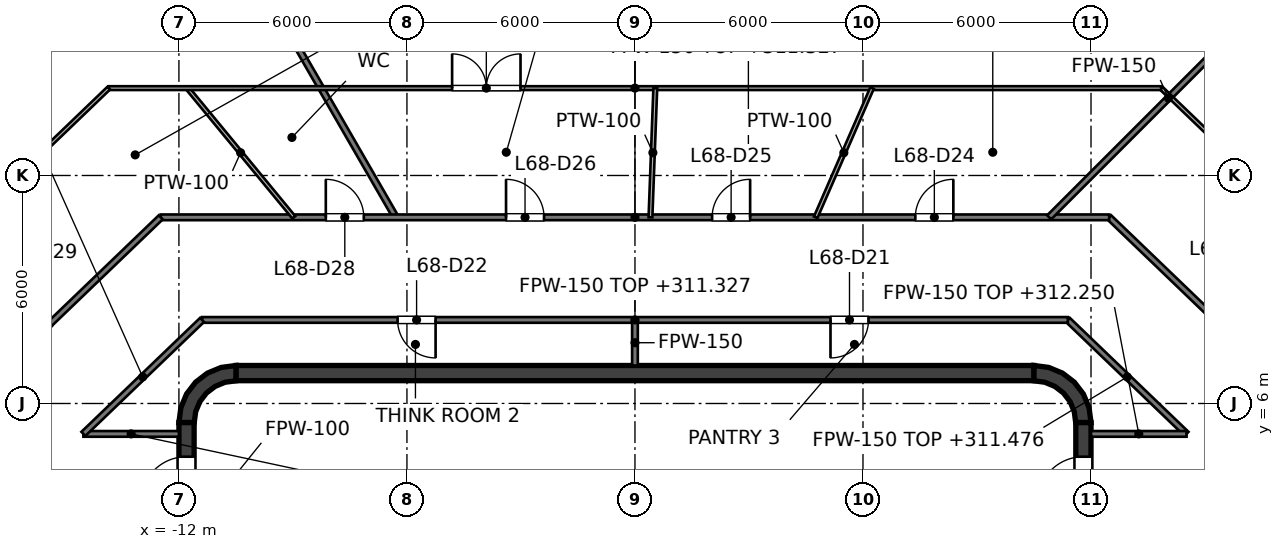
"""IFC4 building model, lengths in metres.
Left out: names, types, materials, properties, quantities, classifications, styles, units other than length and angle.
Written with IfcOpenShell. Run it as: python <this file> out.ifc"""

import sys

from ifc_helpers import new_model, si_unit, direction, frame, frame_2d, origin, place, context, subcontext, project, spatial, polyline, rectangle, outline, extrude, element, fill, save


model = new_model("IFC4")
c1 = context("Model", 3, precision=1e-05, world=origin(), true_north=direction((0.0, 1.0)))
c2 = subcontext(c1, "Body", "Model", "MODEL_VIEW")
j1 = project(units=[si_unit("LENGTHUNIT", "METRE"), si_unit("PLANEANGLEUNIT", "RADIAN")], contexts=[c1])
p1 = place(None, origin())
s1 = spatial("IfcSite", under=j1, at=p1, CompositionType="ELEMENT")
p2 = place(p1, origin())
s2 = spatial("IfcBuilding", under=s1, at=p2, CompositionType="ELEMENT")
p3 = place(p2, frame((0.0, 0.0, 308.4)))
s3 = spatial("IfcBuildingStorey", under=s2, at=p3, CompositionType="ELEMENT", Elevation=308.4)
p4 = place(p3, frame((-10.5, 6.8, 0.0), z_axis=(0.0, 0.0, 1.0), x_axis=(1.0, 0.0, 0.0)))
e1 = element("IfcWall", 1, at=p4, inside=s3, PredefinedType="SHEAR", context=c2, shape_type="SweptSolid", body=[
    extrude(rectangle(XDim=21.0, YDim=0.4, at=frame_2d((10.5, 0.0))), origin(), (0.0, 0.0, 1.0), 4.0),
])
p5 = place(p3, frame((11.8, -5.5, 0.0), z_axis=(0.0, 0.0, 1.0), x_axis=(0.0, 1.0, 0.0)))
e2 = element("IfcWall", 2, at=p5, inside=s3, PredefinedType="SHEAR", context=c2, shape_type="SweptSolid", body=[
    extrude(rectangle(XDim=11.0, YDim=0.4, at=frame_2d((5.5, 0.0))), origin(), (0.0, 0.0, 1.0), 4.0),
])
p6 = place(p5, frame((3.2, 0.0, 0.0)))
e3 = element("IfcOpeningElement", 3, at=p6, cuts=e2, PredefinedType="OPENING", context=c2, shape_type="SweptSolid", body=[
    extrude(rectangle(XDim=1.0, YDim=2.1, at=frame_2d((0.5, 1.05))), frame((0.0, 0.2, 0.0), z_axis=(0.0, -1.0, 0.0), x_axis=(1.0, 0.0, 0.0)), (0.0, 0.0, 1.0), 0.4),
])
p7 = place(p5, frame((6.1, 0.0, 0.0)))
e4 = element("IfcOpeningElement", 4, at=p7, cuts=e2, PredefinedType="OPENING", context=c2, shape_type="SweptSolid", body=[
    extrude(rectangle(XDim=1.0, YDim=2.1, at=frame_2d((0.5, 1.05))), frame((0.0, 0.2, 0.0), z_axis=(0.0, -1.0, 0.0), x_axis=(1.0, 0.0, 0.0)), (0.0, 0.0, 1.0), 0.4),
])
p8 = place(p5, frame((0.9, 0.0, 0.0)))
e5 = element("IfcOpeningElement", 5, at=p8, cuts=e2, PredefinedType="OPENING", context=c2, shape_type="SweptSolid", body=[
    extrude(rectangle(XDim=1.2, YDim=2.1, at=frame_2d((0.6, 1.05))), frame((0.0, 0.2, 0.0), z_axis=(0.0, -1.0, 0.0), x_axis=(1.0, 0.0, 0.0)), (0.0, 0.0, 1.0), 0.4),
])
p9 = place(p5, frame((8.9, 0.0, 0.0)))
e6 = element("IfcOpeningElement", 6, at=p9, cuts=e2, PredefinedType="OPENING", context=c2, shape_type="SweptSolid", body=[
    extrude(rectangle(XDim=1.2, YDim=2.1, at=frame_2d((0.6, 1.05))), frame((0.0, 0.2, 0.0), z_axis=(0.0, -1.0, 0.0), x_axis=(1.0, 0.0, 0.0)), (0.0, 0.0, 1.0), 0.4),
])
p10 = place(p3, frame((-11.8, -5.5, 0.0), z_axis=(0.0, 0.0, 1.0), x_axis=(0.0, 1.0, 0.0)))
e7 = element("IfcWall", 7, at=p10, inside=s3, PredefinedType="SHEAR", context=c2, shape_type="SweptSolid", body=[
    extrude(rectangle(XDim=11.0, YDim=0.4, at=frame_2d((5.5, 0.0))), origin(), (0.0, 0.0, 1.0), 4.0),
])
p11 = place(p10, frame((3.8, 0.0, 0.0)))
e8 = element("IfcOpeningElement", 8, at=p11, cuts=e7, PredefinedType="OPENING", context=c2, shape_type="SweptSolid", body=[
    extrude(rectangle(XDim=1.0, YDim=2.1, at=frame_2d((0.5, 1.05))), frame((0.0, 0.2, 0.0), z_axis=(0.0, -1.0, 0.0), x_axis=(1.0, 0.0, 0.0)), (0.0, 0.0, 1.0), 0.4),
])
p12 = place(p10, frame((6.7, 0.0, 0.0)))
e9 = element("IfcOpeningElement", 9, at=p12, cuts=e7, PredefinedType="OPENING", context=c2, shape_type="SweptSolid", body=[
    extrude(rectangle(XDim=1.0, YDim=2.1, at=frame_2d((0.5, 1.05))), frame((0.0, 0.2, 0.0), z_axis=(0.0, -1.0, 0.0), x_axis=(1.0, 0.0, 0.0)), (0.0, 0.0, 1.0), 0.4),
])
p13 = place(p10, frame((0.9, 0.0, 0.0)))
e10 = element("IfcOpeningElement", 10, at=p13, cuts=e7, PredefinedType="OPENING", context=c2, shape_type="SweptSolid", body=[
    extrude(rectangle(XDim=1.2, YDim=2.1, at=frame_2d((0.6, 1.05))), frame((0.0, 0.2, 0.0), z_axis=(0.0, -1.0, 0.0), x_axis=(1.0, 0.0, 0.0)), (0.0, 0.0, 1.0), 0.4),
])
p14 = place(p10, frame((8.9, 0.0, 0.0)))
e11 = element("IfcOpeningElement", 11, at=p14, cuts=e7, PredefinedType="OPENING", context=c2, shape_type="SweptSolid", body=[
    extrude(rectangle(XDim=1.2, YDim=2.1, at=frame_2d((0.6, 1.05))), frame((0.0, 0.2, 0.0), z_axis=(0.0, -1.0, 0.0), x_axis=(1.0, 0.0, 0.0)), (0.0, 0.0, 1.0), 0.4),
])
p15 = place(p3, origin())
e12 = element("IfcWall", 12, at=p15, inside=s3, PredefinedType="SHEAR", context=c2, shape_type="SweptSolid", body=[
    extrude(outline(polyline([(10.5, 7.0), (10.5, 6.596), (10.784, 6.559), (11.048, 6.45), (11.275, 6.275), (11.45, 6.048), (11.559, 5.784), (11.596, 5.5), (12.0, 5.5), (11.949, 5.888), (11.799, 6.25), (11.561, 6.561), (11.25, 6.799), (10.888, 6.949), (10.5, 7.0)])), origin(), (0.0, 0.0, 1.0), 4.0),
])
e13 = element("IfcWall", 13, at=p15, inside=s3, PredefinedType="SHEAR", context=c2, shape_type="SweptSolid", body=[
    extrude(outline(polyline([(-12.0, 5.5), (-11.596, 5.5), (-11.559, 5.784), (-11.45, 6.048), (-11.275, 6.275), (-11.048, 6.45), (-10.784, 6.559), (-10.5, 6.596), (-10.5, 7.0), (-10.888, 6.949), (-11.25, 6.799), (-11.561, 6.561), (-11.799, 6.25), (-11.949, 5.888), (-12.0, 5.5)])), origin(), (0.0, 0.0, 1.0), 4.0),
])
p16 = place(p3, frame((-1.5, 4.1, 0.0), z_axis=(0.0, 0.0, 1.0), x_axis=(0.0, 1.0, 0.0)))
e14 = element("IfcWall", 14, at=p16, inside=s3, PredefinedType="PARTITIONING", context=c2, shape_type="SweptSolid", body=[
    extrude(rectangle(XDim=2.5, YDim=0.15, at=frame_2d((1.25, 0.0))), origin(), (0.0, 0.0, 1.0), 3.85),
])
p17 = place(p16, frame((0.8, 0.0, 0.0)))
e15 = element("IfcOpeningElement", 15, at=p17, cuts=e14, PredefinedType="OPENING", context=c2, shape_type="SweptSolid", body=[
    extrude(rectangle(XDim=0.9, YDim=2.1, at=frame_2d((0.45, 1.05))), frame((0.0, 0.075, 0.0), z_axis=(0.0, -1.0, 0.0), x_axis=(1.0, 0.0, 0.0)), (0.0, 0.0, 1.0), 0.15),
])
p18 = place(p3, frame((-9.0, 4.1, 0.0), z_axis=(0.0, 0.0, 1.0), x_axis=(0.0, 1.0, 0.0)))
e16 = element("IfcWall", 16, at=p18, inside=s3, PredefinedType="SOLIDWALL", context=c2, shape_type="SweptSolid", body=[
    extrude(rectangle(XDim=2.5, YDim=0.25, at=frame_2d((1.25, 0.0))), origin(), (0.0, 0.0, 1.0), 3.85),
])
p19 = place(p18, frame((0.65, 0.0, 0.0)))
e17 = element("IfcOpeningElement", 17, at=p19, cuts=e16, PredefinedType="OPENING", context=c2, shape_type="SweptSolid", body=[
    extrude(rectangle(XDim=1.2, YDim=2.1, at=frame_2d((0.6, 1.05))), frame((0.0, 0.125, 0.0), z_axis=(0.0, -1.0, 0.0), x_axis=(1.0, 0.0, 0.0)), (0.0, 0.0, 1.0), 0.25),
])
p20 = place(p3, frame((9.0, 4.1, 0.0), z_axis=(0.0, 0.0, 1.0), x_axis=(0.0, 1.0, 0.0)))
e18 = element("IfcWall", 18, at=p20, inside=s3, PredefinedType="SOLIDWALL", context=c2, shape_type="SweptSolid", body=[
    extrude(rectangle(XDim=2.5, YDim=0.25, at=frame_2d((1.25, 0.0))), origin(), (0.0, 0.0, 1.0), 3.85),
])
p21 = place(p20, frame((0.65, 0.0, 0.0)))
e19 = element("IfcOpeningElement", 19, at=p21, cuts=e18, PredefinedType="OPENING", context=c2, shape_type="SweptSolid", body=[
    extrude(rectangle(XDim=1.2, YDim=2.1, at=frame_2d((0.6, 1.05))), frame((0.0, 0.125, 0.0), z_axis=(0.0, -1.0, 0.0), x_axis=(1.0, 0.0, 0.0)), (0.0, 0.0, 1.0), 0.25),
])
for number, where, z_axis, x_axis in (
    (20, (-3.15, 4.1, 0.0), (0.0, 0.0, 1.0), (0.0, 1.0, 0.0)),
    (21, (3.15, 4.1, 0.0), (0.0, 0.0, 1.0), (0.0, 1.0, 0.0)),
):
    element("IfcWall", number, at=place(p3, frame(where, z_axis=z_axis, x_axis=x_axis)), inside=s3, PredefinedType="SOLIDWALL", context=c2, shape_type="SweptSolid", body=[
        extrude(rectangle(XDim=2.5, YDim=0.25, at=frame_2d((1.25, 0.0))), origin(), (0.0, 0.0, 1.0), 3.85),
    ])
p22 = place(p3, frame((-11.73, 20.317, 0.0), z_axis=(0.0, 0.0, 1.0), x_axis=(0.49996861439, -0.866043523516, 0.0)))
e22 = element("IfcWall", 22, at=p22, inside=s3, PredefinedType="PARTITIONING", context=c2, shape_type="SweptSolid", body=[
    extrude(rectangle(XDim=10.875, YDim=0.15, at=frame_2d((5.438, 0.0))), origin(), (0.0, 0.0, 1.0), 3.475),
])
p23 = place(p3, frame((11.391, 8.199, 0.0), z_axis=(0.0, 0.0, 1.0), x_axis=(0.721228427004, -0.692697304803, 0.0)))
e23 = element("IfcWall", 23, at=p23, inside=s3, PredefinedType="PARTITIONING", context=c2, shape_type="SweptSolid", body=[
    extrude(rectangle(XDim=4.33, YDim=0.15, at=frame_2d((2.165, 0.0))), origin(), (0.0, 0.0, 1.0), 3.076),
])
p24 = place(p3, frame((12.478, 10.899, 0.0), z_axis=(0.0, 0.0, 1.0), x_axis=(0.72124338483, -0.692681730551, 0.0)))
e24 = element("IfcWall", 24, at=p24, inside=s3, PredefinedType="PARTITIONING", context=c2, shape_type="SweptSolid", body=[
    extrude(rectangle(XDim=8.915, YDim=0.15, at=frame_2d((4.458, 0.0))), origin(), (0.0, 0.0, 1.0), 3.076),
])
p25 = place(p24, frame((3.907, 0.0, 0.0)))
e25 = element("IfcOpeningElement", 25, at=p25, cuts=e24, PredefinedType="OPENING", context=c2, shape_type="SweptSolid", body=[
    extrude(rectangle(XDim=1.0, YDim=2.1, at=frame_2d((0.5, 1.05))), frame((0.0, 0.075, 0.0), z_axis=(0.0, -1.0, 0.0), x_axis=(1.0, 0.0, 0.0)), (0.0, 0.0, 1.0), 0.15),
])
for number, where, z_axis, x_axis in (
    (26, (-14.514, 5.2, 0.0), (0.0, 0.0, 1.0), (1.0, 0.0, 0.0)),
    (27, (12.0, 5.2, 0.0), (0.0, 0.0, 1.0), (1.0, 0.0, 0.0)),
):
    element("IfcWall", number, at=place(p3, frame(where, z_axis=z_axis, x_axis=x_axis)), inside=s3, PredefinedType="PARTITIONING", context=c2, shape_type="SweptSolid", body=[
        extrude(rectangle(XDim=2.514, YDim=0.15, at=frame_2d((1.257, 0.0))), origin(), (0.0, 0.0, 1.0), 3.85),
    ])
p26 = place(p3, frame((-11.391, 8.199, 0.0), z_axis=(0.0, 0.0, 1.0), x_axis=(1.0, 0.0, 0.0)))
e28 = element("IfcWall", 28, at=p26, inside=s3, PredefinedType="PARTITIONING", context=c2, shape_type="SweptSolid", body=[
    extrude(rectangle(XDim=22.782, YDim=0.15, at=frame_2d((11.391, 0.0))), origin(), (0.0, 0.0, 1.0), 2.927),
])
p27 = place(p26, frame((16.536, 0.0, 0.0)))
e29 = element("IfcOpeningElement", 29, at=p27, cuts=e28, PredefinedType="OPENING", context=c2, shape_type="SweptSolid", body=[
    extrude(rectangle(XDim=1.0, YDim=2.1, at=frame_2d((0.5, 1.05))), frame((0.0, 0.075, 0.0), z_axis=(0.0, -1.0, 0.0), x_axis=(1.0, 0.0, 0.0)), (0.0, 0.0, 1.0), 0.15),
])
p28 = place(p26, frame((5.145, 0.0, 0.0)))
e30 = element("IfcOpeningElement", 30, at=p28, cuts=e28, PredefinedType="OPENING", context=c2, shape_type="SweptSolid", body=[
    extrude(rectangle(XDim=1.0, YDim=2.1, at=frame_2d((0.5, 1.05))), frame((0.0, 0.075, 0.0), z_axis=(0.0, -1.0, 0.0), x_axis=(1.0, 0.0, 0.0)), (0.0, 0.0, 1.0), 0.15),
])
p29 = place(p3, frame((-12.478, 10.899, 0.0), z_axis=(0.0, 0.0, 1.0), x_axis=(1.0, 0.0, 0.0)))
e31 = element("IfcWall", 31, at=p29, inside=s3, PredefinedType="PARTITIONING", context=c2, shape_type="SweptSolid", body=[
    extrude(rectangle(XDim=24.956, YDim=0.15, at=frame_2d((12.478, 0.0))), origin(), (0.0, 0.0, 1.0), 2.927),
])
p30 = place(p29, frame((19.856, 0.0, 0.0)))
e32 = element("IfcOpeningElement", 32, at=p30, cuts=e31, PredefinedType="OPENING", context=c2, shape_type="SweptSolid", body=[
    extrude(rectangle(XDim=1.0, YDim=2.1, at=frame_2d((0.5, 1.05))), frame((0.0, 0.075, 0.0), z_axis=(0.0, -1.0, 0.0), x_axis=(1.0, 0.0, 0.0)), (0.0, 0.0, 1.0), 0.15),
])
p31 = place(p29, frame((14.508, 0.0, 0.0)))
e33 = element("IfcOpeningElement", 33, at=p31, cuts=e31, PredefinedType="OPENING", context=c2, shape_type="SweptSolid", body=[
    extrude(rectangle(XDim=1.0, YDim=2.1, at=frame_2d((0.5, 1.05))), frame((0.0, 0.075, 0.0), z_axis=(0.0, -1.0, 0.0), x_axis=(1.0, 0.0, 0.0)), (0.0, 0.0, 1.0), 0.15),
])
p32 = place(p29, frame((9.085, 0.0, 0.0)))
e34 = element("IfcOpeningElement", 34, at=p32, cuts=e31, PredefinedType="OPENING", context=c2, shape_type="SweptSolid", body=[
    extrude(rectangle(XDim=1.0, YDim=2.1, at=frame_2d((0.5, 1.05))), frame((0.0, 0.075, 0.0), z_axis=(0.0, -1.0, 0.0), x_axis=(1.0, 0.0, 0.0)), (0.0, 0.0, 1.0), 0.15),
])
p33 = place(p29, frame((4.343, 0.0, 0.0)))
e35 = element("IfcOpeningElement", 35, at=p33, cuts=e31, PredefinedType="OPENING", context=c2, shape_type="SweptSolid", body=[
    extrude(rectangle(XDim=1.0, YDim=2.1, at=frame_2d((0.5, 1.05))), frame((0.0, 0.075, 0.0), z_axis=(0.0, -1.0, 0.0), x_axis=(1.0, 0.0, 0.0)), (0.0, 0.0, 1.0), 0.15),
])
p34 = place(p3, frame((-14.514, 5.2, 0.0), z_axis=(0.0, 0.0, 1.0), x_axis=(0.721228427004, 0.692697304803, 0.0)))
e36 = element("IfcWall", 36, at=p34, inside=s3, PredefinedType="PARTITIONING", context=c2, shape_type="SweptSolid", body=[
    extrude(rectangle(XDim=4.33, YDim=0.15, at=frame_2d((2.165, 0.0))), origin(), (0.0, 0.0, 1.0), 3.076),
])
p35 = place(p3, frame((-18.95, 4.683, 0.0), z_axis=(0.0, 0.0, 1.0), x_axis=(0.721259541977, 0.692664906797, 0.0)))
e37 = element("IfcWall", 37, at=p35, inside=s3, PredefinedType="PARTITIONING", context=c2, shape_type="SweptSolid", body=[
    extrude(rectangle(XDim=8.973, YDim=0.15, at=frame_2d((4.487, 0.0))), origin(), (0.0, 0.0, 1.0), 3.076),
])
p36 = place(p35, frame((3.937, 0.0, 0.0)))
e38 = element("IfcOpeningElement", 38, at=p36, cuts=e37, PredefinedType="OPENING", context=c2, shape_type="SweptSolid", body=[
    extrude(rectangle(XDim=1.0, YDim=2.1, at=frame_2d((0.5, 1.05))), frame((0.0, 0.075, 0.0), z_axis=(0.0, -1.0, 0.0), x_axis=(1.0, 0.0, 0.0)), (0.0, 0.0, 1.0), 0.15),
])
p37 = place(p3, frame((10.899, 10.899, 0.0), z_axis=(0.0, 0.0, 1.0), x_axis=(0.707106781187, 0.707106781187, 0.0)))
e39 = element("IfcWall", 39, at=p37, inside=s3, PredefinedType="PARTITIONING", context=c2, shape_type="SweptSolid", body=[
    extrude(rectangle(XDim=8.875, YDim=0.15, at=frame_2d((4.437, 0.0))), origin(), (0.0, 0.0, 1.0), 2.995),
])
p38 = place(p3, frame((0.0, 7.0, 0.0), z_axis=(0.0, 0.0, 1.0), x_axis=(0.0, 1.0, 0.0)))
e40 = element("IfcWall", 40, at=p38, inside=s3, PredefinedType="PARTITIONING", context=c2, shape_type="SweptSolid", body=[
    extrude(rectangle(XDim=1.199, YDim=0.15, at=frame_2d((0.6, 0.0))), origin(), (0.0, 0.0, 1.0), 2.995),
])
p39 = place(p3, frame((-11.777, 14.299, 0.0), z_axis=(0.0, 0.0, 1.0), x_axis=(0.63569753872, -0.771938235396, 0.0)))
e41 = element("IfcWall", 41, at=p39, inside=s3, PredefinedType="PARTITIONING", context=c2, shape_type="SweptSolid", body=[
    extrude(rectangle(XDim=4.405, YDim=0.1, at=frame_2d((2.202, 0.0))), origin(), (0.0, 0.0, 1.0), 3.85),
])
p40 = place(p3, frame((13.846, 14.299, 0.0), z_axis=(0.0, 0.0, 1.0), x_axis=(0.72117874289, -0.692749031615, 0.0)))
e42 = element("IfcWall", 42, at=p40, inside=s3, PredefinedType="PARTITIONING", context=c2, shape_type="SweptSolid", body=[
    extrude(rectangle(XDim=11.791, YDim=0.1, at=frame_2d((5.896, 0.0))), origin(), (0.0, 0.0, 1.0), 2.995),
])
p41 = place(p40, frame((5.557, 0.0, 0.0)))
e43 = element("IfcOpeningElement", 43, at=p41, cuts=e42, PredefinedType="OPENING", context=c2, shape_type="SweptSolid", body=[
    extrude(rectangle(XDim=0.9, YDim=2.1, at=frame_2d((0.45, 1.05))), frame((0.0, 0.05, 0.0), z_axis=(0.0, -1.0, 0.0), x_axis=(1.0, 0.0, 0.0)), (0.0, 0.0, 1.0), 0.1),
])
p42 = place(p3, frame((-13.846, 14.299, 0.0), z_axis=(0.0, 0.0, 1.0), x_axis=(1.0, 0.0, 0.0)))
e44 = element("IfcWall", 44, at=p42, inside=s3, PredefinedType="PARTITIONING", context=c2, shape_type="SweptSolid", body=[
    extrude(rectangle(XDim=27.692, YDim=0.1, at=frame_2d((13.846, 0.0))), origin(), (0.0, 0.0, 1.0), 2.927),
])
p43 = place(p42, frame((9.035, 0.0, 0.0)))
e45 = element("IfcOpeningElement", 45, at=p43, cuts=e44, PredefinedType="OPENING", context=c2, shape_type="SweptSolid", body=[
    extrude(rectangle(XDim=1.8, YDim=2.1, at=frame_2d((0.9, 1.05))), frame((0.0, 0.05, 0.0), z_axis=(0.0, -1.0, 0.0), x_axis=(1.0, 0.0, 0.0)), (0.0, 0.0, 1.0), 0.1),
])
p44 = place(p3, frame((-22.35, 6.132, 0.0), z_axis=(0.0, 0.0, 1.0), x_axis=(0.721259864686, 0.692664570765, 0.0)))
e46 = element("IfcWall", 46, at=p44, inside=s3, PredefinedType="PARTITIONING", context=c2, shape_type="SweptSolid", body=[
    extrude(rectangle(XDim=11.791, YDim=0.1, at=frame_2d((5.896, 0.0))), origin(), (0.0, 0.0, 1.0), 2.995),
])
p45 = place(p44, frame((5.445, 0.0, 0.0)))
e47 = element("IfcOpeningElement", 47, at=p45, cuts=e46, PredefinedType="OPENING", context=c2, shape_type="SweptSolid", body=[
    extrude(rectangle(XDim=0.9, YDim=2.1, at=frame_2d((0.45, 1.05))), frame((0.0, 0.05, 0.0), z_axis=(0.0, -1.0, 0.0), x_axis=(1.0, 0.0, 0.0)), (0.0, 0.0, 1.0), 0.1),
])
p46 = place(p3, frame((4.755, 10.899, 0.0), z_axis=(0.0, 0.0, 1.0), x_axis=(0.399820811011, 0.916593322626, 0.0)))
e48 = element("IfcWall", 48, at=p46, inside=s3, PredefinedType="PARTITIONING", context=c2, shape_type="SweptSolid", body=[
    extrude(rectangle(XDim=3.709, YDim=0.1, at=frame_2d((1.855, 0.0))), origin(), (0.0, 0.0, 1.0), 3.85),
])
p47 = place(p3, frame((0.408, 10.899, 0.0), z_axis=(0.0, 0.0, 1.0), x_axis=(0.037311546962, 0.999303681802, 0.0)))
e49 = element("IfcWall", 49, at=p47, inside=s3, PredefinedType="PARTITIONING", context=c2, shape_type="SweptSolid", body=[
    extrude(rectangle(XDim=3.403, YDim=0.1, at=frame_2d((1.701, 0.0))), origin(), (0.0, 0.0, 1.0), 3.85),
])
p48 = place(p19, origin())
e50 = element("IfcDoor", 50, at=p48, inside=s3, OperationType="SINGLE_SWING_RIGHT", PredefinedType="DOOR", context=c2, shape_type="SweptSolid", body=[
    extrude(rectangle(XDim=1.2, YDim=2.1, at=frame_2d((0.6, 1.05))), frame((0.0, 0.025, 0.0), z_axis=(0.0, -1.0, 0.0), x_axis=(1.0, 0.0, 0.0)), (0.0, 0.0, 1.0), 0.05),
])
fill(e17, e50)
p49 = place(p21, origin())
e51 = element("IfcDoor", 51, at=p49, inside=s3, OperationType="SINGLE_SWING_LEFT", PredefinedType="DOOR", context=c2, shape_type="SweptSolid", body=[
    extrude(rectangle(XDim=1.2, YDim=2.1, at=frame_2d((0.6, 1.05))), frame((0.0, 0.025, 0.0), z_axis=(0.0, -1.0, 0.0), x_axis=(1.0, 0.0, 0.0)), (0.0, 0.0, 1.0), 0.05),
])
fill(e19, e51)
p50 = place(p17, origin())
e52 = element("IfcDoor", 52, at=p50, inside=s3, OperationType="SINGLE_SWING_LEFT", PredefinedType="DOOR", context=c2, shape_type="SweptSolid", body=[
    extrude(rectangle(XDim=0.9, YDim=2.1, at=frame_2d((0.45, 1.05))), frame((0.0, 0.025, 0.0), z_axis=(0.0, -1.0, 0.0), x_axis=(1.0, 0.0, 0.0)), (0.0, 0.0, 1.0), 0.05),
])
fill(e15, e52)
p51 = place(p14, origin())
e53 = element("IfcDoor", 53, at=p51, inside=s3, OperationType="SINGLE_SWING_LEFT", PredefinedType="DOOR", context=c2, shape_type="SweptSolid", body=[
    extrude(rectangle(XDim=1.2, YDim=2.1, at=frame_2d((0.6, 1.05))), frame((0.0, 0.025, 0.0), z_axis=(0.0, -1.0, 0.0), x_axis=(1.0, 0.0, 0.0)), (0.0, 0.0, 1.0), 0.05),
])
fill(e11, e53)
p52 = place(p9, origin())
e54 = element("IfcDoor", 54, at=p52, inside=s3, OperationType="SINGLE_SWING_LEFT", PredefinedType="DOOR", context=c2, shape_type="SweptSolid", body=[
    extrude(rectangle(XDim=1.2, YDim=2.1, at=frame_2d((0.6, 1.05))), frame((0.0, 0.025, 0.0), z_axis=(0.0, -1.0, 0.0), x_axis=(1.0, 0.0, 0.0)), (0.0, 0.0, 1.0), 0.05),
])
fill(e6, e54)
p53 = place(p27, origin())
e55 = element("IfcDoor", 55, at=p53, inside=s3, OperationType="SINGLE_SWING_LEFT", PredefinedType="DOOR", context=c2, shape_type="SweptSolid", body=[
    extrude(rectangle(XDim=1.0, YDim=2.1, at=frame_2d((0.5, 1.05))), frame((0.0, 0.025, 0.0), z_axis=(0.0, -1.0, 0.0), x_axis=(1.0, 0.0, 0.0)), (0.0, 0.0, 1.0), 0.05),
])
fill(e29, e55)
p54 = place(p28, origin())
e56 = element("IfcDoor", 56, at=p54, inside=s3, OperationType="SINGLE_SWING_RIGHT", PredefinedType="DOOR", context=c2, shape_type="SweptSolid", body=[
    extrude(rectangle(XDim=1.0, YDim=2.1, at=frame_2d((0.5, 1.05))), frame((0.0, 0.025, 0.0), z_axis=(0.0, -1.0, 0.0), x_axis=(1.0, 0.0, 0.0)), (0.0, 0.0, 1.0), 0.05),
])
fill(e30, e56)
p55 = place(p30, origin())
e57 = element("IfcDoor", 57, at=p55, inside=s3, OperationType="SINGLE_SWING_RIGHT", PredefinedType="DOOR", context=c2, shape_type="SweptSolid", body=[
    extrude(rectangle(XDim=1.0, YDim=2.1, at=frame_2d((0.5, 1.05))), frame((0.0, 0.025, 0.0), z_axis=(0.0, -1.0, 0.0), x_axis=(1.0, 0.0, 0.0)), (0.0, 0.0, 1.0), 0.05),
])
fill(e32, e57)
p56 = place(p31, origin())
e58 = element("IfcDoor", 58, at=p56, inside=s3, OperationType="SINGLE_SWING_RIGHT", PredefinedType="DOOR", context=c2, shape_type="SweptSolid", body=[
    extrude(rectangle(XDim=1.0, YDim=2.1, at=frame_2d((0.5, 1.05))), frame((0.0, 0.025, 0.0), z_axis=(0.0, -1.0, 0.0), x_axis=(1.0, 0.0, 0.0)), (0.0, 0.0, 1.0), 0.05),
])
fill(e33, e58)
p57 = place(p32, origin())
e59 = element("IfcDoor", 59, at=p57, inside=s3, OperationType="SINGLE_SWING_LEFT", PredefinedType="DOOR", context=c2, shape_type="SweptSolid", body=[
    extrude(rectangle(XDim=1.0, YDim=2.1, at=frame_2d((0.5, 1.05))), frame((0.0, 0.025, 0.0), z_axis=(0.0, -1.0, 0.0), x_axis=(1.0, 0.0, 0.0)), (0.0, 0.0, 1.0), 0.05),
])
fill(e34, e59)
p58 = place(p43, origin())
e60 = element("IfcDoor", 60, at=p58, inside=s3, OperationType="DOUBLE_DOOR_SINGLE_SWING", PredefinedType="DOOR", context=c2, shape_type="SweptSolid", body=[
    extrude(rectangle(XDim=1.8, YDim=2.1, at=frame_2d((0.9, 1.05))), frame((0.0, 0.025, 0.0), z_axis=(0.0, -1.0, 0.0), x_axis=(1.0, 0.0, 0.0)), (0.0, 0.0, 1.0), 0.05),
])
fill(e45, e60)
p59 = place(p33, origin())
e61 = element("IfcDoor", 61, at=p59, inside=s3, OperationType="SINGLE_SWING_LEFT", PredefinedType="DOOR", context=c2, shape_type="SweptSolid", body=[
    extrude(rectangle(XDim=1.0, YDim=2.1, at=frame_2d((0.5, 1.05))), frame((0.0, 0.025, 0.0), z_axis=(0.0, -1.0, 0.0), x_axis=(1.0, 0.0, 0.0)), (0.0, 0.0, 1.0), 0.05),
])
fill(e35, e61)
save(model, sys.argv[1])
